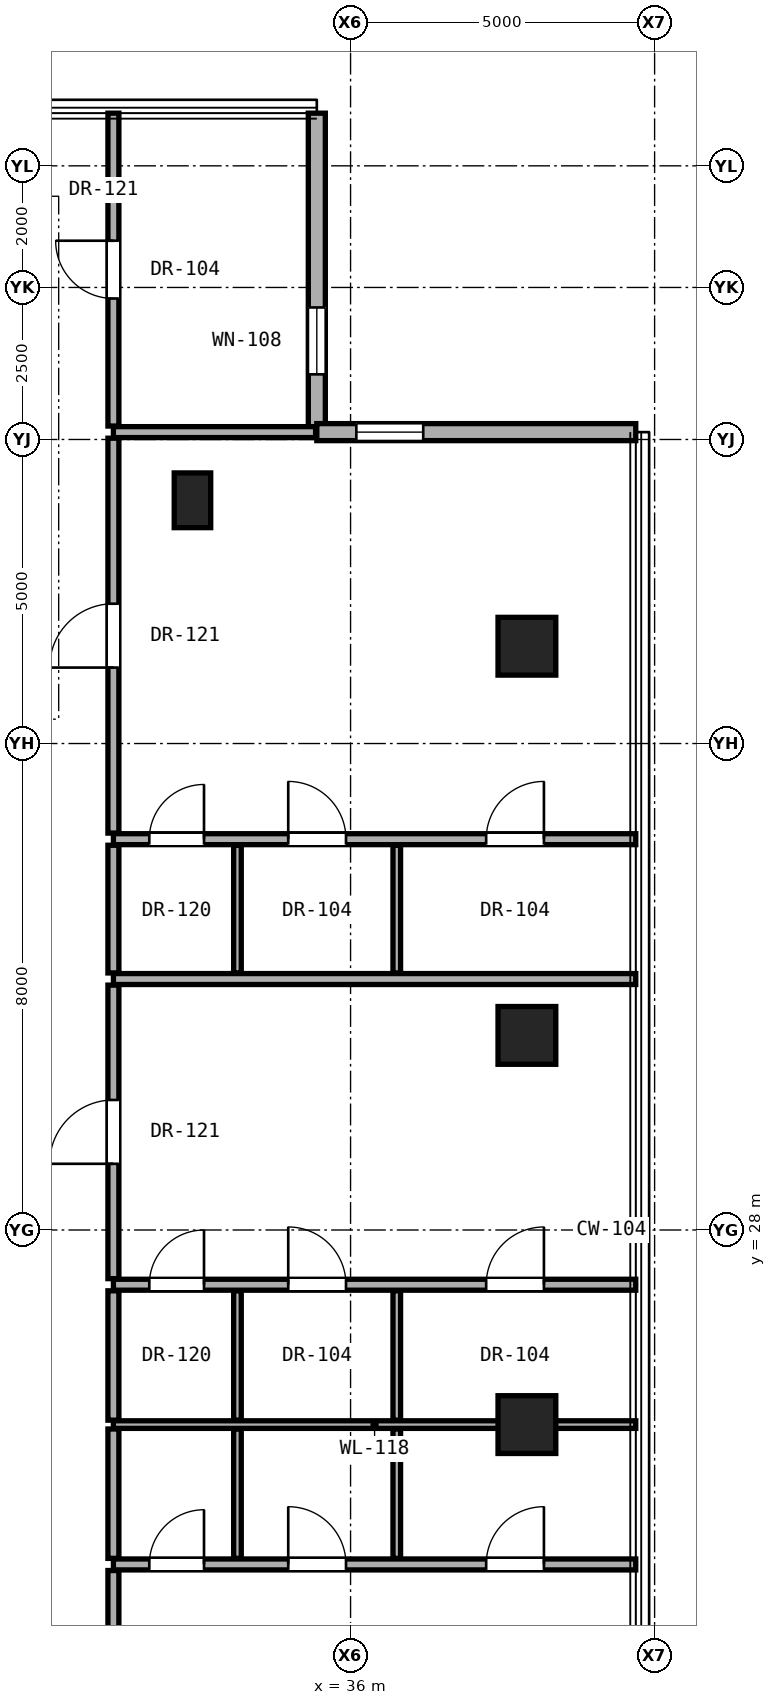
"""IFC4 building model, lengths in metres.
Left out: names, types, materials, properties, quantities, classifications, styles, units other than length and angle.
Written with IfcOpenShell. Run it as: python <this file> out.ifc"""

import sys

from ifc_helpers import new_model, si_unit, direction, frame, frame_2d, origin, origin_2d, place, context, subcontext, project, spatial, rectangle, hollow_rectangle, extrude, element, fill, save


model = new_model("IFC4")
c1 = context("Model", 3, precision=1e-05, world=origin(), true_north=direction((0.0, 1.0)))
c2 = subcontext(c1, "Body", "Model", "MODEL_VIEW")
j1 = project(units=[si_unit("LENGTHUNIT", "METRE"), si_unit("PLANEANGLEUNIT", "RADIAN")], contexts=[c1])
p1 = place(None, origin())
s1 = spatial("IfcSite", under=j1, at=p1, CompositionType="ELEMENT")
p2 = place(p1, origin())
s2 = spatial("IfcBuilding", under=s1, at=p2, CompositionType="ELEMENT")
p3 = place(p2, frame((0.0, 0.0, 160.9)))
s3 = spatial("IfcBuildingStorey", under=s2, at=p3, CompositionType="ELEMENT", Elevation=160.9)
for number, where, z_axis, x_axis in (
    (1, (38.9, 24.8, 0.0), (0.0, 0.0, 1.0), (1.0, 0.0, 0.0)),
    (2, (38.9, 31.2, 0.0), (0.0, 0.0, 1.0), (1.0, 0.0, 0.0)),
    (3, (38.9, 37.6, 0.0), (0.0, 0.0, 1.0), (1.0, 0.0, 0.0)),
):
    element("IfcColumn", number, at=place(p3, frame(where, z_axis=z_axis, x_axis=x_axis)), inside=s3, PredefinedType="COLUMN", context=c2, shape_type="SweptSolid", body=[
        extrude(hollow_rectangle(XDim=0.95, YDim=0.95, WallThickness=0.05, at=origin_2d()), origin(), (0.0, 0.0, 1.0), 3.25),
    ])
p4 = place(p3, frame((33.4, 40.0, 0.0), z_axis=(0.0, 0.0, 1.0), x_axis=(1.0, 0.0, 0.0)))
e4 = element("IfcColumn", 4, at=p4, inside=s3, PredefinedType="PILASTER", context=c2, shape_type="SweptSolid", body=[
    extrude(rectangle(XDim=0.6, YDim=0.9, at=origin_2d()), origin(), (0.0, 0.0, 1.0), 3.25),
])
p5 = place(p3, frame((35.445, 41.121, 0.0), z_axis=(0.0, 0.0, 1.0), x_axis=(0.0, 1.0, 0.0)))
e5 = element("IfcWall", 5, at=p5, inside=s3, PredefinedType="SOLIDWALL", context=c2, shape_type="SweptSolid", body=[
    extrude(rectangle(XDim=5.245, YDim=0.28, at=frame_2d((2.623, 0.0))), origin(), (0.0, 0.0, 1.0), 3.03),
])
p6 = place(p5, frame((0.95, 0.0, 0.85)))
e6 = element("IfcOpeningElement", 6, at=p6, cuts=e5, PredefinedType="OPENING", context=c2, shape_type="SweptSolid", body=[
    extrude(rectangle(XDim=1.1, YDim=2.0, at=frame_2d((0.55, 1.0))), frame((0.0, 0.15, 0.0), z_axis=(0.0, -1.0, 0.0), x_axis=(1.0, 0.0, 0.0)), (0.0, 0.0, 1.0), 0.3),
])
p7 = place(p3, frame((40.69, 41.121, 0.0), z_axis=(0.0, 0.0, 1.0), x_axis=(-1.0, 0.0, 0.0)))
e7 = element("IfcWall", 7, at=p7, inside=s3, PredefinedType="SOLIDWALL", context=c2, shape_type="SweptSolid", body=[
    extrude(rectangle(XDim=5.245, YDim=0.28, at=frame_2d((2.623, 0.0))), origin(), (0.0, 0.0, 1.0), 3.03),
])
p8 = place(p7, frame((3.495, 0.0, 0.85)))
e8 = element("IfcOpeningElement", 8, at=p8, cuts=e7, PredefinedType="OPENING", context=c2, shape_type="SweptSolid", body=[
    extrude(rectangle(XDim=1.1, YDim=2.0, at=frame_2d((0.55, 1.0))), frame((0.0, 0.15, 0.0), z_axis=(0.0, -1.0, 0.0), x_axis=(1.0, 0.0, 0.0)), (0.0, 0.0, 1.0), 0.3),
])
p9 = place(p3, frame((32.1, 22.5, 0.0), z_axis=(0.0, 0.0, 1.0), x_axis=(1.0, 0.0, 0.0)))
e9 = element("IfcWall", 9, at=p9, inside=s3, PredefinedType="PARTITIONING", context=c2, shape_type="SweptSolid", body=[
    extrude(rectangle(XDim=8.59, YDim=0.18, at=frame_2d((4.295, 0.0))), origin(), (0.0, 0.0, 1.0), 2.269),
])
p10 = place(p9, frame((6.13, 0.0, 0.0)))
e10 = element("IfcOpeningElement", 10, at=p10, cuts=e9, PredefinedType="OPENING", context=c2, shape_type="SweptSolid", body=[
    extrude(rectangle(XDim=0.95, YDim=2.15, at=frame_2d((0.475, 1.075))), frame((0.0, 0.1, 0.0), z_axis=(0.0, -1.0, 0.0), x_axis=(1.0, 0.0, 0.0)), (0.0, 0.0, 1.0), 0.2),
])
p11 = place(p9, frame((2.875, 0.0, 0.0)))
e11 = element("IfcOpeningElement", 11, at=p11, cuts=e9, PredefinedType="OPENING", context=c2, shape_type="SweptSolid", body=[
    extrude(rectangle(XDim=0.95, YDim=2.15, at=frame_2d((0.475, 1.075))), frame((0.0, 0.1, 0.0), z_axis=(0.0, -1.0, 0.0), x_axis=(1.0, 0.0, 0.0)), (0.0, 0.0, 1.0), 0.2),
])
p12 = place(p9, frame((0.59, 0.0, 0.0)))
e12 = element("IfcOpeningElement", 12, at=p12, cuts=e9, PredefinedType="OPENING", context=c2, shape_type="SweptSolid", body=[
    extrude(rectangle(XDim=0.9, YDim=2.1, at=frame_2d((0.45, 1.05))), frame((0.0, 0.1, 0.0), z_axis=(0.0, -1.0, 0.0), x_axis=(1.0, 0.0, 0.0)), (0.0, 0.0, 1.0), 0.2),
])
p13 = place(p3, frame((32.1, 24.8, 0.0), z_axis=(0.0, 0.0, 1.0), x_axis=(1.0, 0.0, 0.0)))
e13 = element("IfcWall", 13, at=p13, inside=s3, PredefinedType="PARTITIONING", context=c2, shape_type="SweptSolid", body=[
    extrude(rectangle(XDim=8.59, YDim=0.125, at=frame_2d((4.295, 0.0))), origin(), (0.0, 0.0, 1.0), 2.269),
])
p14 = place(p3, frame((32.1, 27.1, 0.0), z_axis=(0.0, 0.0, 1.0), x_axis=(1.0, 0.0, 0.0)))
e14 = element("IfcWall", 14, at=p14, inside=s3, PredefinedType="PARTITIONING", context=c2, shape_type="SweptSolid", body=[
    extrude(rectangle(XDim=8.59, YDim=0.18, at=frame_2d((4.295, 0.0))), origin(), (0.0, 0.0, 1.0), 2.269),
])
p15 = place(p14, frame((6.13, 0.0, 0.0)))
e15 = element("IfcOpeningElement", 15, at=p15, cuts=e14, PredefinedType="OPENING", context=c2, shape_type="SweptSolid", body=[
    extrude(rectangle(XDim=0.95, YDim=2.15, at=frame_2d((0.475, 1.075))), frame((0.0, 0.1, 0.0), z_axis=(0.0, -1.0, 0.0), x_axis=(1.0, 0.0, 0.0)), (0.0, 0.0, 1.0), 0.2),
])
p16 = place(p14, frame((2.875, 0.0, 0.0)))
e16 = element("IfcOpeningElement", 16, at=p16, cuts=e14, PredefinedType="OPENING", context=c2, shape_type="SweptSolid", body=[
    extrude(rectangle(XDim=0.95, YDim=2.15, at=frame_2d((0.475, 1.075))), frame((0.0, 0.1, 0.0), z_axis=(0.0, -1.0, 0.0), x_axis=(1.0, 0.0, 0.0)), (0.0, 0.0, 1.0), 0.2),
])
p17 = place(p14, frame((0.59, 0.0, 0.0)))
e17 = element("IfcOpeningElement", 17, at=p17, cuts=e14, PredefinedType="OPENING", context=c2, shape_type="SweptSolid", body=[
    extrude(rectangle(XDim=0.9, YDim=2.1, at=frame_2d((0.45, 1.05))), frame((0.0, 0.1, 0.0), z_axis=(0.0, -1.0, 0.0), x_axis=(1.0, 0.0, 0.0)), (0.0, 0.0, 1.0), 0.2),
])
p18 = place(p3, frame((32.1, 32.127, 0.0), z_axis=(0.0, 0.0, 1.0), x_axis=(1.0, 0.0, 0.0)))
e18 = element("IfcWall", 18, at=p18, inside=s3, PredefinedType="PARTITIONING", context=c2, shape_type="SweptSolid", body=[
    extrude(rectangle(XDim=8.59, YDim=0.18, at=frame_2d((4.295, 0.0))), origin(), (0.0, 0.0, 1.0), 2.269),
])
p19 = place(p3, frame((32.1, 34.427, 0.0), z_axis=(0.0, 0.0, 1.0), x_axis=(1.0, 0.0, 0.0)))
e19 = element("IfcWall", 19, at=p19, inside=s3, PredefinedType="PARTITIONING", context=c2, shape_type="SweptSolid", body=[
    extrude(rectangle(XDim=8.59, YDim=0.18, at=frame_2d((4.295, 0.0))), origin(), (0.0, 0.0, 1.0), 2.269),
])
p20 = place(p19, frame((6.13, 0.0, 0.0)))
e20 = element("IfcOpeningElement", 20, at=p20, cuts=e19, PredefinedType="OPENING", context=c2, shape_type="SweptSolid", body=[
    extrude(rectangle(XDim=0.95, YDim=2.15, at=frame_2d((0.475, 1.075))), frame((0.0, 0.1, 0.0), z_axis=(0.0, -1.0, 0.0), x_axis=(1.0, 0.0, 0.0)), (0.0, 0.0, 1.0), 0.2),
])
p21 = place(p19, frame((2.875, 0.0, 0.0)))
e21 = element("IfcOpeningElement", 21, at=p21, cuts=e19, PredefinedType="OPENING", context=c2, shape_type="SweptSolid", body=[
    extrude(rectangle(XDim=0.95, YDim=2.15, at=frame_2d((0.475, 1.075))), frame((0.0, 0.1, 0.0), z_axis=(0.0, -1.0, 0.0), x_axis=(1.0, 0.0, 0.0)), (0.0, 0.0, 1.0), 0.2),
])
p22 = place(p19, frame((0.59, 0.0, 0.0)))
e22 = element("IfcOpeningElement", 22, at=p22, cuts=e19, PredefinedType="OPENING", context=c2, shape_type="SweptSolid", body=[
    extrude(rectangle(XDim=0.9, YDim=2.1, at=frame_2d((0.45, 1.05))), frame((0.0, 0.1, 0.0), z_axis=(0.0, -1.0, 0.0), x_axis=(1.0, 0.0, 0.0)), (0.0, 0.0, 1.0), 0.2),
])
p23 = place(p3, frame((32.1, 41.121, 0.0), z_axis=(0.0, 0.0, 1.0), x_axis=(1.0, 0.0, 0.0)))
e23 = element("IfcWall", 23, at=p23, inside=s3, PredefinedType="PARTITIONING", context=c2, shape_type="SweptSolid", body=[
    extrude(rectangle(XDim=3.325, YDim=0.18, at=frame_2d((1.663, 0.0))), origin(), (0.0, 0.0, 1.0), 3.05),
])
p24 = place(p3, frame((32.1, 14.979, 0.0), z_axis=(0.0, 0.0, 1.0), x_axis=(0.0, 1.0, 0.0)))
e24 = element("IfcWall", 24, at=p24, inside=s3, PredefinedType="PARTITIONING", context=c2, shape_type="SweptSolid", body=[
    extrude(rectangle(XDim=7.421, YDim=0.18, at=frame_2d((3.71, 0.0))), origin(), (0.0, 0.0, 1.0), 2.442),
])
p25 = place(p24, frame((3.186, 0.0, 0.0)))
e25 = element("IfcOpeningElement", 25, at=p25, cuts=e24, PredefinedType="OPENING", context=c2, shape_type="SweptSolid", body=[
    extrude(rectangle(XDim=1.05, YDim=2.2, at=frame_2d((0.525, 1.1))), frame((0.0, 0.1, 0.0), z_axis=(0.0, -1.0, 0.0), x_axis=(1.0, 0.0, 0.0)), (0.0, 0.0, 1.0), 0.2),
])
for number, where, z_axis, x_axis in (
    (26, (32.1, 22.6, 0.0), (0.0, 0.0, 1.0), (0.0, 1.0, 0.0)),
    (27, (32.1, 24.873, 0.0), (0.0, 0.0, 1.0), (0.0, 1.0, 0.0)),
):
    element("IfcWall", number, at=place(p3, frame(where, z_axis=z_axis, x_axis=x_axis)), inside=s3, PredefinedType="PARTITIONING", context=c2, shape_type="SweptSolid", body=[
        extrude(rectangle(XDim=2.127, YDim=0.18, at=frame_2d((1.064, 0.0))), origin(), (0.0, 0.0, 1.0), 2.346),
    ])
p26 = place(p3, frame((32.1, 27.2, 0.0), z_axis=(0.0, 0.0, 1.0), x_axis=(0.0, 1.0, 0.0)))
e28 = element("IfcWall", 28, at=p26, inside=s3, PredefinedType="PARTITIONING", context=c2, shape_type="SweptSolid", body=[
    extrude(rectangle(XDim=4.827, YDim=0.18, at=frame_2d((2.414, 0.0))), origin(), (0.0, 0.0, 1.0), 2.346),
])
p27 = place(p26, frame((1.888, 0.0, 0.0)))
e29 = element("IfcOpeningElement", 29, at=p27, cuts=e28, PredefinedType="OPENING", context=c2, shape_type="SweptSolid", body=[
    extrude(rectangle(XDim=1.05, YDim=2.2, at=frame_2d((0.525, 1.1))), frame((0.0, 0.1, 0.0), z_axis=(0.0, -1.0, 0.0), x_axis=(1.0, 0.0, 0.0)), (0.0, 0.0, 1.0), 0.2),
])
p28 = place(p3, frame((32.1, 32.227, 0.0), z_axis=(0.0, 0.0, 1.0), x_axis=(0.0, 1.0, 0.0)))
e30 = element("IfcWall", 30, at=p28, inside=s3, PredefinedType="PARTITIONING", context=c2, shape_type="SweptSolid", body=[
    extrude(rectangle(XDim=2.1, YDim=0.18, at=frame_2d((1.05, 0.0))), origin(), (0.0, 0.0, 1.0), 3.05),
])
p29 = place(p3, frame((32.1, 34.527, 0.0), z_axis=(0.0, 0.0, 1.0), x_axis=(0.0, 1.0, 0.0)))
e31 = element("IfcWall", 31, at=p29, inside=s3, PredefinedType="PARTITIONING", context=c2, shape_type="SweptSolid", body=[
    extrude(rectangle(XDim=6.494, YDim=0.18, at=frame_2d((3.247, 0.0))), origin(), (0.0, 0.0, 1.0), 2.442),
])
p30 = place(p29, frame((2.722, 0.0, 0.0)))
e32 = element("IfcOpeningElement", 32, at=p30, cuts=e31, PredefinedType="OPENING", context=c2, shape_type="SweptSolid", body=[
    extrude(rectangle(XDim=1.05, YDim=2.2, at=frame_2d((0.525, 1.1))), frame((0.0, 0.1, 0.0), z_axis=(0.0, -1.0, 0.0), x_axis=(1.0, 0.0, 0.0)), (0.0, 0.0, 1.0), 0.2),
])
p31 = place(p3, frame((32.1, 41.221, 0.0), z_axis=(0.0, 0.0, 1.0), x_axis=(0.0, 1.0, 0.0)))
e33 = element("IfcWall", 33, at=p31, inside=s3, PredefinedType="PARTITIONING", context=c2, shape_type="SweptSolid", body=[
    extrude(rectangle(XDim=5.145, YDim=0.18, at=frame_2d((2.573, 0.0))), origin(), (0.0, 0.0, 1.0), 3.05),
])
p32 = place(p31, frame((2.097, 0.0, 0.0)))
e34 = element("IfcOpeningElement", 34, at=p32, cuts=e33, PredefinedType="OPENING", context=c2, shape_type="SweptSolid", body=[
    extrude(rectangle(XDim=0.95, YDim=2.15, at=frame_2d((0.475, 1.075))), frame((0.0, 0.1, 0.0), z_axis=(0.0, -1.0, 0.0), x_axis=(1.0, 0.0, 0.0)), (0.0, 0.0, 1.0), 0.2),
])
for number, where, z_axis, x_axis in (
    (35, (34.14, 22.6, 0.0), (0.0, 0.0, 1.0), (0.0, 1.0, 0.0)),
    (36, (34.14, 24.873, 0.0), (0.0, 0.0, 1.0), (0.0, 1.0, 0.0)),
):
    element("IfcWall", number, at=place(p3, frame(where, z_axis=z_axis, x_axis=x_axis)), inside=s3, PredefinedType="PARTITIONING", context=c2, shape_type="SweptSolid", body=[
        extrude(rectangle(XDim=2.127, YDim=0.125, at=frame_2d((1.064, 0.0))), origin(), (0.0, 0.0, 1.0), 2.346),
    ])
p33 = place(p3, frame((34.14, 32.227, 0.0), z_axis=(0.0, 0.0, 1.0), x_axis=(0.0, 1.0, 0.0)))
e37 = element("IfcWall", 37, at=p33, inside=s3, PredefinedType="PARTITIONING", context=c2, shape_type="SweptSolid", body=[
    extrude(rectangle(XDim=2.1, YDim=0.125, at=frame_2d((1.05, 0.0))), origin(), (0.0, 0.0, 1.0), 3.05),
])
for number, where, z_axis, x_axis in (
    (38, (36.76, 22.6, 0.0), (0.0, 0.0, 1.0), (0.0, 1.0, 0.0)),
    (39, (36.76, 24.873, 0.0), (0.0, 0.0, 1.0), (0.0, 1.0, 0.0)),
):
    element("IfcWall", number, at=place(p3, frame(where, z_axis=z_axis, x_axis=x_axis)), inside=s3, PredefinedType="PARTITIONING", context=c2, shape_type="SweptSolid", body=[
        extrude(rectangle(XDim=2.127, YDim=0.125, at=frame_2d((1.064, 0.0))), origin(), (0.0, 0.0, 1.0), 2.346),
    ])
p34 = place(p3, frame((36.76, 32.227, 0.0), z_axis=(0.0, 0.0, 1.0), x_axis=(0.0, 1.0, 0.0)))
e40 = element("IfcWall", 40, at=p34, inside=s3, PredefinedType="PARTITIONING", context=c2, shape_type="SweptSolid", body=[
    extrude(rectangle(XDim=2.1, YDim=0.125, at=frame_2d((1.05, 0.0))), origin(), (0.0, 0.0, 1.0), 3.05),
])
p35 = place(p6, origin())
e41 = element("IfcWindow", 41, at=p35, inside=s3, PartitioningType="SINGLE_PANEL", PredefinedType="WINDOW", context=c2, shape_type="SweptSolid", body=[
    extrude(rectangle(XDim=1.1, YDim=2.0, at=frame_2d((0.55, 1.0))), frame((0.0, 0.03, 0.0), z_axis=(0.0, -1.0, 0.0), x_axis=(1.0, 0.0, 0.0)), (0.0, 0.0, 1.0), 0.06),
])
fill(e6, e41)
p36 = place(p8, origin())
e42 = element("IfcWindow", 42, at=p36, inside=s3, PartitioningType="SINGLE_PANEL", PredefinedType="WINDOW", context=c2, shape_type="SweptSolid", body=[
    extrude(rectangle(XDim=1.1, YDim=2.0, at=frame_2d((0.55, 1.0))), frame((0.0, 0.03, 0.0), z_axis=(0.0, -1.0, 0.0), x_axis=(1.0, 0.0, 0.0)), (0.0, 0.0, 1.0), 0.06),
])
fill(e8, e42)
p37 = place(p10, origin())
e43 = element("IfcDoor", 43, at=p37, inside=s3, OperationType="SINGLE_SWING_RIGHT", PredefinedType="DOOR", context=c2, shape_type="SweptSolid", body=[
    extrude(rectangle(XDim=0.95, YDim=2.15, at=frame_2d((0.475, 1.075))), frame((0.0, 0.025, 0.0), z_axis=(0.0, -1.0, 0.0), x_axis=(1.0, 0.0, 0.0)), (0.0, 0.0, 1.0), 0.05),
])
fill(e10, e43)
p38 = place(p11, origin())
e44 = element("IfcDoor", 44, at=p38, inside=s3, OperationType="SINGLE_SWING_LEFT", PredefinedType="DOOR", context=c2, shape_type="SweptSolid", body=[
    extrude(rectangle(XDim=0.95, YDim=2.15, at=frame_2d((0.475, 1.075))), frame((0.0, 0.025, 0.0), z_axis=(0.0, -1.0, 0.0), x_axis=(1.0, 0.0, 0.0)), (0.0, 0.0, 1.0), 0.05),
])
fill(e11, e44)
p39 = place(p12, origin())
e45 = element("IfcDoor", 45, at=p39, inside=s3, OperationType="SINGLE_SWING_RIGHT", PredefinedType="DOOR", context=c2, shape_type="SweptSolid", body=[
    extrude(rectangle(XDim=0.9, YDim=2.1, at=frame_2d((0.45, 1.05))), frame((0.0, 0.025, 0.0), z_axis=(0.0, -1.0, 0.0), x_axis=(1.0, 0.0, 0.0)), (0.0, 0.0, 1.0), 0.05),
])
fill(e12, e45)
p40 = place(p27, origin())
e46 = element("IfcDoor", 46, at=p40, inside=s3, OperationType="SINGLE_SWING_LEFT", PredefinedType="DOOR", context=c2, shape_type="SweptSolid", body=[
    extrude(rectangle(XDim=1.05, YDim=2.2, at=frame_2d((0.525, 1.1))), frame((0.0, 0.025, 0.0), z_axis=(0.0, -1.0, 0.0), x_axis=(1.0, 0.0, 0.0)), (0.0, 0.0, 1.0), 0.05),
])
fill(e29, e46)
p41 = place(p15, origin())
e47 = element("IfcDoor", 47, at=p41, inside=s3, OperationType="SINGLE_SWING_RIGHT", PredefinedType="DOOR", context=c2, shape_type="SweptSolid", body=[
    extrude(rectangle(XDim=0.95, YDim=2.15, at=frame_2d((0.475, 1.075))), frame((0.0, 0.025, 0.0), z_axis=(0.0, -1.0, 0.0), x_axis=(1.0, 0.0, 0.0)), (0.0, 0.0, 1.0), 0.05),
])
fill(e15, e47)
p42 = place(p16, origin())
e48 = element("IfcDoor", 48, at=p42, inside=s3, OperationType="SINGLE_SWING_LEFT", PredefinedType="DOOR", context=c2, shape_type="SweptSolid", body=[
    extrude(rectangle(XDim=0.95, YDim=2.15, at=frame_2d((0.475, 1.075))), frame((0.0, 0.025, 0.0), z_axis=(0.0, -1.0, 0.0), x_axis=(1.0, 0.0, 0.0)), (0.0, 0.0, 1.0), 0.05),
])
fill(e16, e48)
p43 = place(p17, origin())
e49 = element("IfcDoor", 49, at=p43, inside=s3, OperationType="SINGLE_SWING_RIGHT", PredefinedType="DOOR", context=c2, shape_type="SweptSolid", body=[
    extrude(rectangle(XDim=0.9, YDim=2.1, at=frame_2d((0.45, 1.05))), frame((0.0, 0.025, 0.0), z_axis=(0.0, -1.0, 0.0), x_axis=(1.0, 0.0, 0.0)), (0.0, 0.0, 1.0), 0.05),
])
fill(e17, e49)
p44 = place(p30, origin())
e50 = element("IfcDoor", 50, at=p44, inside=s3, OperationType="SINGLE_SWING_LEFT", PredefinedType="DOOR", context=c2, shape_type="SweptSolid", body=[
    extrude(rectangle(XDim=1.05, YDim=2.2, at=frame_2d((0.525, 1.1))), frame((0.0, 0.025, 0.0), z_axis=(0.0, -1.0, 0.0), x_axis=(1.0, 0.0, 0.0)), (0.0, 0.0, 1.0), 0.05),
])
fill(e32, e50)
p45 = place(p20, origin())
e51 = element("IfcDoor", 51, at=p45, inside=s3, OperationType="SINGLE_SWING_RIGHT", PredefinedType="DOOR", context=c2, shape_type="SweptSolid", body=[
    extrude(rectangle(XDim=0.95, YDim=2.15, at=frame_2d((0.475, 1.075))), frame((0.0, 0.025, 0.0), z_axis=(0.0, -1.0, 0.0), x_axis=(1.0, 0.0, 0.0)), (0.0, 0.0, 1.0), 0.05),
])
fill(e20, e51)
p46 = place(p21, origin())
e52 = element("IfcDoor", 52, at=p46, inside=s3, OperationType="SINGLE_SWING_LEFT", PredefinedType="DOOR", context=c2, shape_type="SweptSolid", body=[
    extrude(rectangle(XDim=0.95, YDim=2.15, at=frame_2d((0.475, 1.075))), frame((0.0, 0.025, 0.0), z_axis=(0.0, -1.0, 0.0), x_axis=(1.0, 0.0, 0.0)), (0.0, 0.0, 1.0), 0.05),
])
fill(e21, e52)
p47 = place(p22, origin())
e53 = element("IfcDoor", 53, at=p47, inside=s3, OperationType="SINGLE_SWING_RIGHT", PredefinedType="DOOR", context=c2, shape_type="SweptSolid", body=[
    extrude(rectangle(XDim=0.9, YDim=2.1, at=frame_2d((0.45, 1.05))), frame((0.0, 0.025, 0.0), z_axis=(0.0, -1.0, 0.0), x_axis=(1.0, 0.0, 0.0)), (0.0, 0.0, 1.0), 0.05),
])
fill(e22, e53)
p48 = place(p32, origin())
e54 = element("IfcDoor", 54, at=p48, inside=s3, OperationType="SINGLE_SWING_RIGHT", PredefinedType="DOOR", context=c2, shape_type="SweptSolid", body=[
    extrude(rectangle(XDim=0.95, YDim=2.15, at=frame_2d((0.475, 1.075))), frame((0.0, 0.025, 0.0), z_axis=(0.0, -1.0, 0.0), x_axis=(1.0, 0.0, 0.0)), (0.0, 0.0, 1.0), 0.05),
])
fill(e34, e54)
save(model, sys.argv[1])
